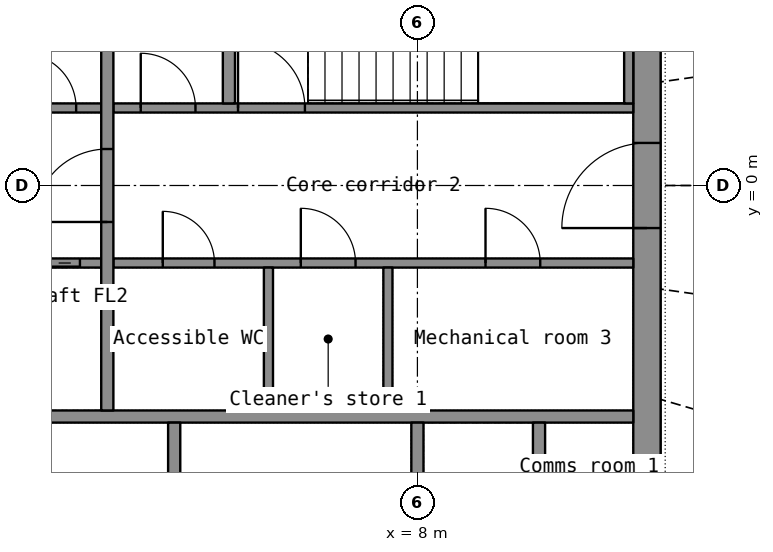
"""IFC4 building model, lengths in metres.
Left out: names, types, materials, properties, quantities, classifications, styles, units other than length and angle.
Written with IfcOpenShell. Run it as: python <this file> out.ifc"""

import sys

from ifc_helpers import new_model, si_unit, direction, frame, frame_2d, origin, place, context, subcontext, project, spatial, rectangle, extrude, element, fill, save


model = new_model("IFC4")
c1 = context("Model", 3, precision=1e-05, world=origin(), true_north=direction((0.0, 1.0)))
c2 = subcontext(c1, "Body", "Model", "MODEL_VIEW")
j1 = project(units=[si_unit("LENGTHUNIT", "METRE"), si_unit("PLANEANGLEUNIT", "RADIAN")], contexts=[c1])
p1 = place(None, origin())
s1 = spatial("IfcSite", under=j1, at=p1, CompositionType="ELEMENT")
p2 = place(p1, origin())
s2 = spatial("IfcBuilding", under=s1, at=p2, CompositionType="ELEMENT")
p3 = place(p2, frame((0.0, 0.0, 168.2)))
s3 = spatial("IfcBuildingStorey", under=s2, at=p3, CompositionType="ELEMENT", Elevation=168.2)
p4 = place(p3, frame((11.775, -7.2, 0.0), z_axis=(0.0, 0.0, 1.0), x_axis=(0.0, 1.0, 0.0)))
e1 = element("IfcWall", 1, at=p4, inside=s3, PredefinedType="SHEAR", context=c2, shape_type="SweptSolid", body=[
    extrude(rectangle(XDim=14.4, YDim=0.45, at=frame_2d((7.2, 0.0))), origin(), (0.0, 0.0, 1.0), 3.3),
])
p5 = place(p4, frame((6.5, 0.0, 0.0)))
e2 = element("IfcOpeningElement", 2, at=p5, cuts=e1, PredefinedType="OPENING", context=c2, shape_type="SweptSolid", body=[
    extrude(rectangle(XDim=1.4, YDim=2.2, at=frame_2d((0.7, 1.1))), frame((0.0, 0.235, 0.0), z_axis=(0.0, -1.0, 0.0), x_axis=(1.0, 0.0, 0.0)), (0.0, 0.0, 1.0), 0.47),
])
p6 = place(p3, frame((-11.55, -3.8, 0.0), z_axis=(0.0, 0.0, 1.0), x_axis=(1.0, 0.0, 0.0)))
e3 = element("IfcWall", 3, at=p6, inside=s3, PredefinedType="SHEAR", context=c2, shape_type="SweptSolid", body=[
    extrude(rectangle(XDim=23.1, YDim=0.2, at=frame_2d((11.55, 0.0))), origin(), (0.0, 0.0, 1.0), 3.3),
])
for number, where, z_axis, x_axis in (
    (4, (8.0, -6.75, 0.0), (0.0, 0.0, 1.0), (0.0, 1.0, 0.0)),
    (5, (10.0, -6.75, 0.0), (0.0, 0.0, 1.0), (0.0, 1.0, 0.0)),
):
    element("IfcWall", number, at=place(p3, frame(where, z_axis=z_axis, x_axis=x_axis)), inside=s3, PredefinedType="SHEAR", context=c2, shape_type="SweptSolid", body=[
        extrude(rectangle(XDim=2.85, YDim=0.2, at=frame_2d((1.425, 0.0))), origin(), (0.0, 0.0, 1.0), 3.3),
    ])
p7 = place(p3, frame((4.0, -6.75, 0.0), z_axis=(0.0, 0.0, 1.0), x_axis=(0.0, 1.0, 0.0)))
e6 = element("IfcWall", 6, at=p7, inside=s3, PredefinedType="PARTITIONING", context=c2, shape_type="SweptSolid", body=[
    extrude(rectangle(XDim=2.85, YDim=0.2, at=frame_2d((1.425, 0.0))), origin(), (0.0, 0.0, 1.0), 3.3),
])
p8 = place(p3, frame((-2.8, -1.275, 0.0), z_axis=(0.0, 0.0, 1.0), x_axis=(1.0, 0.0, 0.0)))
e7 = element("IfcWall", 7, at=p8, inside=s3, PredefinedType="SHEAR", context=c2, shape_type="SweptSolid", body=[
    extrude(rectangle(XDim=5.6, YDim=0.15, at=frame_2d((2.8, 0.0))), origin(), (0.0, 0.0, 1.0), 3.3),
])
p9 = place(p8, frame((4.15, 0.0, 0.0)))
e8 = element("IfcOpeningElement", 8, at=p9, cuts=e7, PredefinedType="OPENING", context=c2, shape_type="SweptSolid", body=[
    extrude(rectangle(XDim=1.1, YDim=2.2, at=frame_2d((0.55, 1.1))), frame((0.0, 0.085, 0.0), z_axis=(0.0, -1.0, 0.0), x_axis=(1.0, 0.0, 0.0)), (0.0, 0.0, 1.0), 0.17),
])
p10 = place(p8, frame((0.499, 0.0, 0.0)))
e9 = element("IfcOpeningElement", 9, at=p10, cuts=e7, PredefinedType="OPENING", context=c2, shape_type="SweptSolid", body=[
    extrude(rectangle(XDim=0.9, YDim=2.1, at=frame_2d((0.45, 1.05))), frame((0.0, 0.085, 0.0), z_axis=(0.0, -1.0, 0.0), x_axis=(1.0, 0.0, 0.0)), (0.0, 0.0, 1.0), 0.17),
])
p11 = place(p8, frame((2.374, 0.0, 0.0)))
e10 = element("IfcOpeningElement", 10, at=p11, cuts=e7, PredefinedType="OPENING", context=c2, shape_type="SweptSolid", body=[
    extrude(rectangle(XDim=0.9, YDim=2.1, at=frame_2d((0.45, 1.05))), frame((0.0, 0.085, 0.0), z_axis=(0.0, -1.0, 0.0), x_axis=(1.0, 0.0, 0.0)), (0.0, 0.0, 1.0), 0.17),
])
p12 = place(p3, frame((3.0, -1.275, 0.0), z_axis=(0.0, 0.0, 1.0), x_axis=(1.0, 0.0, 0.0)))
e11 = element("IfcWall", 11, at=p12, inside=s3, PredefinedType="PARTITIONING", context=c2, shape_type="SweptSolid", body=[
    extrude(rectangle(XDim=8.55, YDim=0.15, at=frame_2d((4.275, 0.0))), origin(), (0.0, 0.0, 1.0), 3.3),
])
p13 = place(p12, frame((0.812, 0.0, 0.0)))
e12 = element("IfcOpeningElement", 12, at=p13, cuts=e11, PredefinedType="OPENING", context=c2, shape_type="SweptSolid", body=[
    extrude(rectangle(XDim=0.85, YDim=2.1, at=frame_2d((0.425, 1.05))), frame((0.0, 0.085, 0.0), z_axis=(0.0, -1.0, 0.0), x_axis=(1.0, 0.0, 0.0)), (0.0, 0.0, 1.0), 0.17),
])
p14 = place(p12, frame((3.083, 0.0, 0.0)))
e13 = element("IfcOpeningElement", 13, at=p14, cuts=e11, PredefinedType="OPENING", context=c2, shape_type="SweptSolid", body=[
    extrude(rectangle(XDim=0.9, YDim=2.1, at=frame_2d((0.45, 1.05))), frame((0.0, 0.085, 0.0), z_axis=(0.0, -1.0, 0.0), x_axis=(1.0, 0.0, 0.0)), (0.0, 0.0, 1.0), 0.17),
])
p15 = place(p12, frame((6.12, 0.0, 0.0)))
e14 = element("IfcOpeningElement", 14, at=p15, cuts=e11, PredefinedType="OPENING", context=c2, shape_type="SweptSolid", body=[
    extrude(rectangle(XDim=0.9, YDim=2.1, at=frame_2d((0.45, 1.05))), frame((0.0, 0.085, 0.0), z_axis=(0.0, -1.0, 0.0), x_axis=(1.0, 0.0, 0.0)), (0.0, 0.0, 1.0), 0.17),
])
p16 = place(p3, frame((-2.8, 1.275, 0.0), z_axis=(0.0, 0.0, 1.0), x_axis=(1.0, 0.0, 0.0)))
e15 = element("IfcWall", 15, at=p16, inside=s3, PredefinedType="SHEAR", context=c2, shape_type="SweptSolid", body=[
    extrude(rectangle(XDim=5.6, YDim=0.15, at=frame_2d((2.8, 0.0))), origin(), (0.0, 0.0, 1.0), 3.3),
])
p17 = place(p16, frame((0.35, 0.0, 0.0)))
e16 = element("IfcOpeningElement", 16, at=p17, cuts=e15, PredefinedType="OPENING", context=c2, shape_type="SweptSolid", body=[
    extrude(rectangle(XDim=1.1, YDim=2.2, at=frame_2d((0.55, 1.1))), frame((0.0, 0.085, 0.0), z_axis=(0.0, -1.0, 0.0), x_axis=(1.0, 0.0, 0.0)), (0.0, 0.0, 1.0), 0.17),
])
p18 = place(p16, frame((2.413, 0.0, 0.0)))
e17 = element("IfcOpeningElement", 17, at=p18, cuts=e15, PredefinedType="OPENING", context=c2, shape_type="SweptSolid", body=[
    extrude(rectangle(XDim=0.9, YDim=2.1, at=frame_2d((0.45, 1.05))), frame((0.0, 0.085, 0.0), z_axis=(0.0, -1.0, 0.0), x_axis=(1.0, 0.0, 0.0)), (0.0, 0.0, 1.0), 0.17),
])
p19 = place(p16, frame((4.288, 0.0, 0.0)))
e18 = element("IfcOpeningElement", 18, at=p19, cuts=e15, PredefinedType="OPENING", context=c2, shape_type="SweptSolid", body=[
    extrude(rectangle(XDim=0.9, YDim=2.1, at=frame_2d((0.45, 1.05))), frame((0.0, 0.085, 0.0), z_axis=(0.0, -1.0, 0.0), x_axis=(1.0, 0.0, 0.0)), (0.0, 0.0, 1.0), 0.17),
])
p20 = place(p3, frame((3.0, 1.275, 0.0), z_axis=(0.0, 0.0, 1.0), x_axis=(1.0, 0.0, 0.0)))
e19 = element("IfcWall", 19, at=p20, inside=s3, PredefinedType="SHEAR", context=c2, shape_type="SweptSolid", body=[
    extrude(rectangle(XDim=8.55, YDim=0.15, at=frame_2d((4.275, 0.0))), origin(), (0.0, 0.0, 1.0), 3.3),
])
p21 = place(p20, frame((2.05, 0.0, 0.0)))
e20 = element("IfcOpeningElement", 20, at=p21, cuts=e19, PredefinedType="OPENING", context=c2, shape_type="SweptSolid", body=[
    extrude(rectangle(XDim=1.1, YDim=2.15, at=frame_2d((0.55, 1.075))), frame((0.0, 0.085, 0.0), z_axis=(0.0, -1.0, 0.0), x_axis=(1.0, 0.0, 0.0)), (0.0, 0.0, 1.0), 0.17),
])
p22 = place(p20, frame((0.45, 0.0, 0.0)))
e21 = element("IfcOpeningElement", 21, at=p22, cuts=e19, PredefinedType="OPENING", context=c2, shape_type="SweptSolid", body=[
    extrude(rectangle(XDim=0.9, YDim=2.1, at=frame_2d((0.45, 1.05))), frame((0.0, 0.085, 0.0), z_axis=(0.0, -1.0, 0.0), x_axis=(1.0, 0.0, 0.0)), (0.0, 0.0, 1.0), 0.17),
])
p23 = place(p3, frame((2.9, -3.7, 0.0), z_axis=(0.0, 0.0, 1.0), x_axis=(0.0, 1.0, 0.0)))
e22 = element("IfcWall", 22, at=p23, inside=s3, PredefinedType="SHEAR", context=c2, shape_type="SweptSolid", body=[
    extrude(rectangle(XDim=7.4, YDim=0.2, at=frame_2d((3.7, 0.0))), origin(), (0.0, 0.0, 1.0), 3.3),
])
p24 = place(p23, frame((3.1, 0.0, 0.0)))
e23 = element("IfcOpeningElement", 23, at=p24, cuts=e22, PredefinedType="OPENING", context=c2, shape_type="SweptSolid", body=[
    extrude(rectangle(XDim=1.2, YDim=2.2, at=frame_2d((0.6, 1.1))), frame((0.0, 0.11, 0.0), z_axis=(0.0, -1.0, 0.0), x_axis=(1.0, 0.0, 0.0)), (0.0, 0.0, 1.0), 0.22),
])
p25 = place(p3, frame((11.475, 1.35, 0.0), z_axis=(0.0, 0.0, 1.0), x_axis=(0.0, 1.0, 0.0)))
e24 = element("IfcWall", 24, at=p25, inside=s3, PredefinedType="SHEAR", context=c2, shape_type="SweptSolid", body=[
    extrude(rectangle(XDim=2.35, YDim=0.15, at=frame_2d((1.175, 0.0))), origin(), (0.0, 0.0, 1.0), 3.3),
])
p26 = place(p3, frame((4.9, 1.35, 0.0), z_axis=(0.0, 0.0, 1.0), x_axis=(0.0, 1.0, 0.0)))
e25 = element("IfcWall", 25, at=p26, inside=s3, PredefinedType="SHEAR", context=c2, shape_type="SweptSolid", body=[
    extrude(rectangle(XDim=2.35, YDim=0.2, at=frame_2d((1.175, 0.0))), origin(), (0.0, 0.0, 1.0), 3.3),
])
for number, where, z_axis, x_axis in (
    (26, (5.55, -3.7, 0.0), (0.0, 0.0, 1.0), (0.0, 1.0, 0.0)),
    (27, (7.515, -3.7, 0.0), (0.0, 0.0, 1.0), (0.0, 1.0, 0.0)),
):
    element("IfcWall", number, at=place(p3, frame(where, z_axis=z_axis, x_axis=x_axis)), inside=s3, PredefinedType="PARTITIONING", context=c2, shape_type="SweptSolid", body=[
        extrude(rectangle(XDim=2.35, YDim=0.15, at=frame_2d((1.175, 0.0))), origin(), (0.0, 0.0, 1.0), 3.3),
    ])
p27 = place(p5, origin())
e28 = element("IfcDoor", 28, at=p27, inside=s3, OperationType="DOUBLE_DOOR_SINGLE_SWING", PredefinedType="DOOR", context=c2, shape_type="SweptSolid", body=[
    extrude(rectangle(XDim=1.4, YDim=2.2, at=frame_2d((0.7, 1.1))), frame((0.0, 0.025, 0.0), z_axis=(0.0, -1.0, 0.0), x_axis=(1.0, 0.0, 0.0)), (0.0, 0.0, 1.0), 0.05),
])
fill(e2, e28)
p28 = place(p24, origin())
e29 = element("IfcDoor", 29, at=p28, inside=s3, OperationType="SINGLE_SWING_LEFT", PredefinedType="DOOR", context=c2, shape_type="SweptSolid", body=[
    extrude(rectangle(XDim=1.2, YDim=2.2, at=frame_2d((0.6, 1.1))), frame((0.0, 0.025, 0.0), z_axis=(0.0, -1.0, 0.0), x_axis=(1.0, 0.0, 0.0)), (0.0, 0.0, 1.0), 0.05),
])
fill(e23, e29)
p29 = place(p9, origin())
e30 = element("IfcDoor", 30, at=p29, inside=s3, OperationType="DOUBLE_DOOR_SLIDING", PredefinedType="DOOR", context=c2, shape_type="SweptSolid", body=[
    extrude(rectangle(XDim=1.1, YDim=2.2, at=frame_2d((0.55, 1.1))), frame((0.0, 0.025, 0.0), z_axis=(0.0, -1.0, 0.0), x_axis=(1.0, 0.0, 0.0)), (0.0, 0.0, 1.0), 0.05),
])
fill(e8, e30)
p30 = place(p21, origin())
e31 = element("IfcDoor", 31, at=p30, inside=s3, OperationType="SINGLE_SWING_LEFT", PredefinedType="DOOR", context=c2, shape_type="SweptSolid", body=[
    extrude(rectangle(XDim=1.1, YDim=2.15, at=frame_2d((0.55, 1.075))), frame((0.0, 0.025, 0.0), z_axis=(0.0, -1.0, 0.0), x_axis=(1.0, 0.0, 0.0)), (0.0, 0.0, 1.0), 0.05),
])
fill(e20, e31)
p31 = place(p13, origin())
e32 = element("IfcDoor", 32, at=p31, inside=s3, OperationType="SINGLE_SWING_LEFT", PredefinedType="DOOR", context=c2, shape_type="SweptSolid", body=[
    extrude(rectangle(XDim=0.85, YDim=2.1, at=frame_2d((0.425, 1.05))), frame((0.0, 0.025, 0.0), z_axis=(0.0, -1.0, 0.0), x_axis=(1.0, 0.0, 0.0)), (0.0, 0.0, 1.0), 0.05),
])
fill(e12, e32)
p32 = place(p14, origin())
e33 = element("IfcDoor", 33, at=p32, inside=s3, OperationType="SINGLE_SWING_LEFT", PredefinedType="DOOR", context=c2, shape_type="SweptSolid", body=[
    extrude(rectangle(XDim=0.9, YDim=2.1, at=frame_2d((0.45, 1.05))), frame((0.0, 0.025, 0.0), z_axis=(0.0, -1.0, 0.0), x_axis=(1.0, 0.0, 0.0)), (0.0, 0.0, 1.0), 0.05),
])
fill(e13, e33)
p33 = place(p15, origin())
e34 = element("IfcDoor", 34, at=p33, inside=s3, OperationType="SINGLE_SWING_LEFT", PredefinedType="DOOR", context=c2, shape_type="SweptSolid", body=[
    extrude(rectangle(XDim=0.9, YDim=2.1, at=frame_2d((0.45, 1.05))), frame((0.0, 0.025, 0.0), z_axis=(0.0, -1.0, 0.0), x_axis=(1.0, 0.0, 0.0)), (0.0, 0.0, 1.0), 0.05),
])
fill(e14, e34)
p34 = place(p19, origin())
e35 = element("IfcDoor", 35, at=p34, inside=s3, OperationType="SINGLE_SWING_LEFT", PredefinedType="DOOR", context=c2, shape_type="SweptSolid", body=[
    extrude(rectangle(XDim=0.9, YDim=2.1, at=frame_2d((0.45, 1.05))), frame((0.0, 0.025, 0.0), z_axis=(0.0, -1.0, 0.0), x_axis=(1.0, 0.0, 0.0)), (0.0, 0.0, 1.0), 0.05),
])
fill(e18, e35)
p35 = place(p22, origin())
e36 = element("IfcDoor", 36, at=p35, inside=s3, OperationType="SINGLE_SWING_LEFT", PredefinedType="DOOR", context=c2, shape_type="SweptSolid", body=[
    extrude(rectangle(XDim=0.9, YDim=2.1, at=frame_2d((0.45, 1.05))), frame((0.0, 0.025, 0.0), z_axis=(0.0, -1.0, 0.0), x_axis=(1.0, 0.0, 0.0)), (0.0, 0.0, 1.0), 0.05),
])
fill(e21, e36)
save(model, sys.argv[1])
